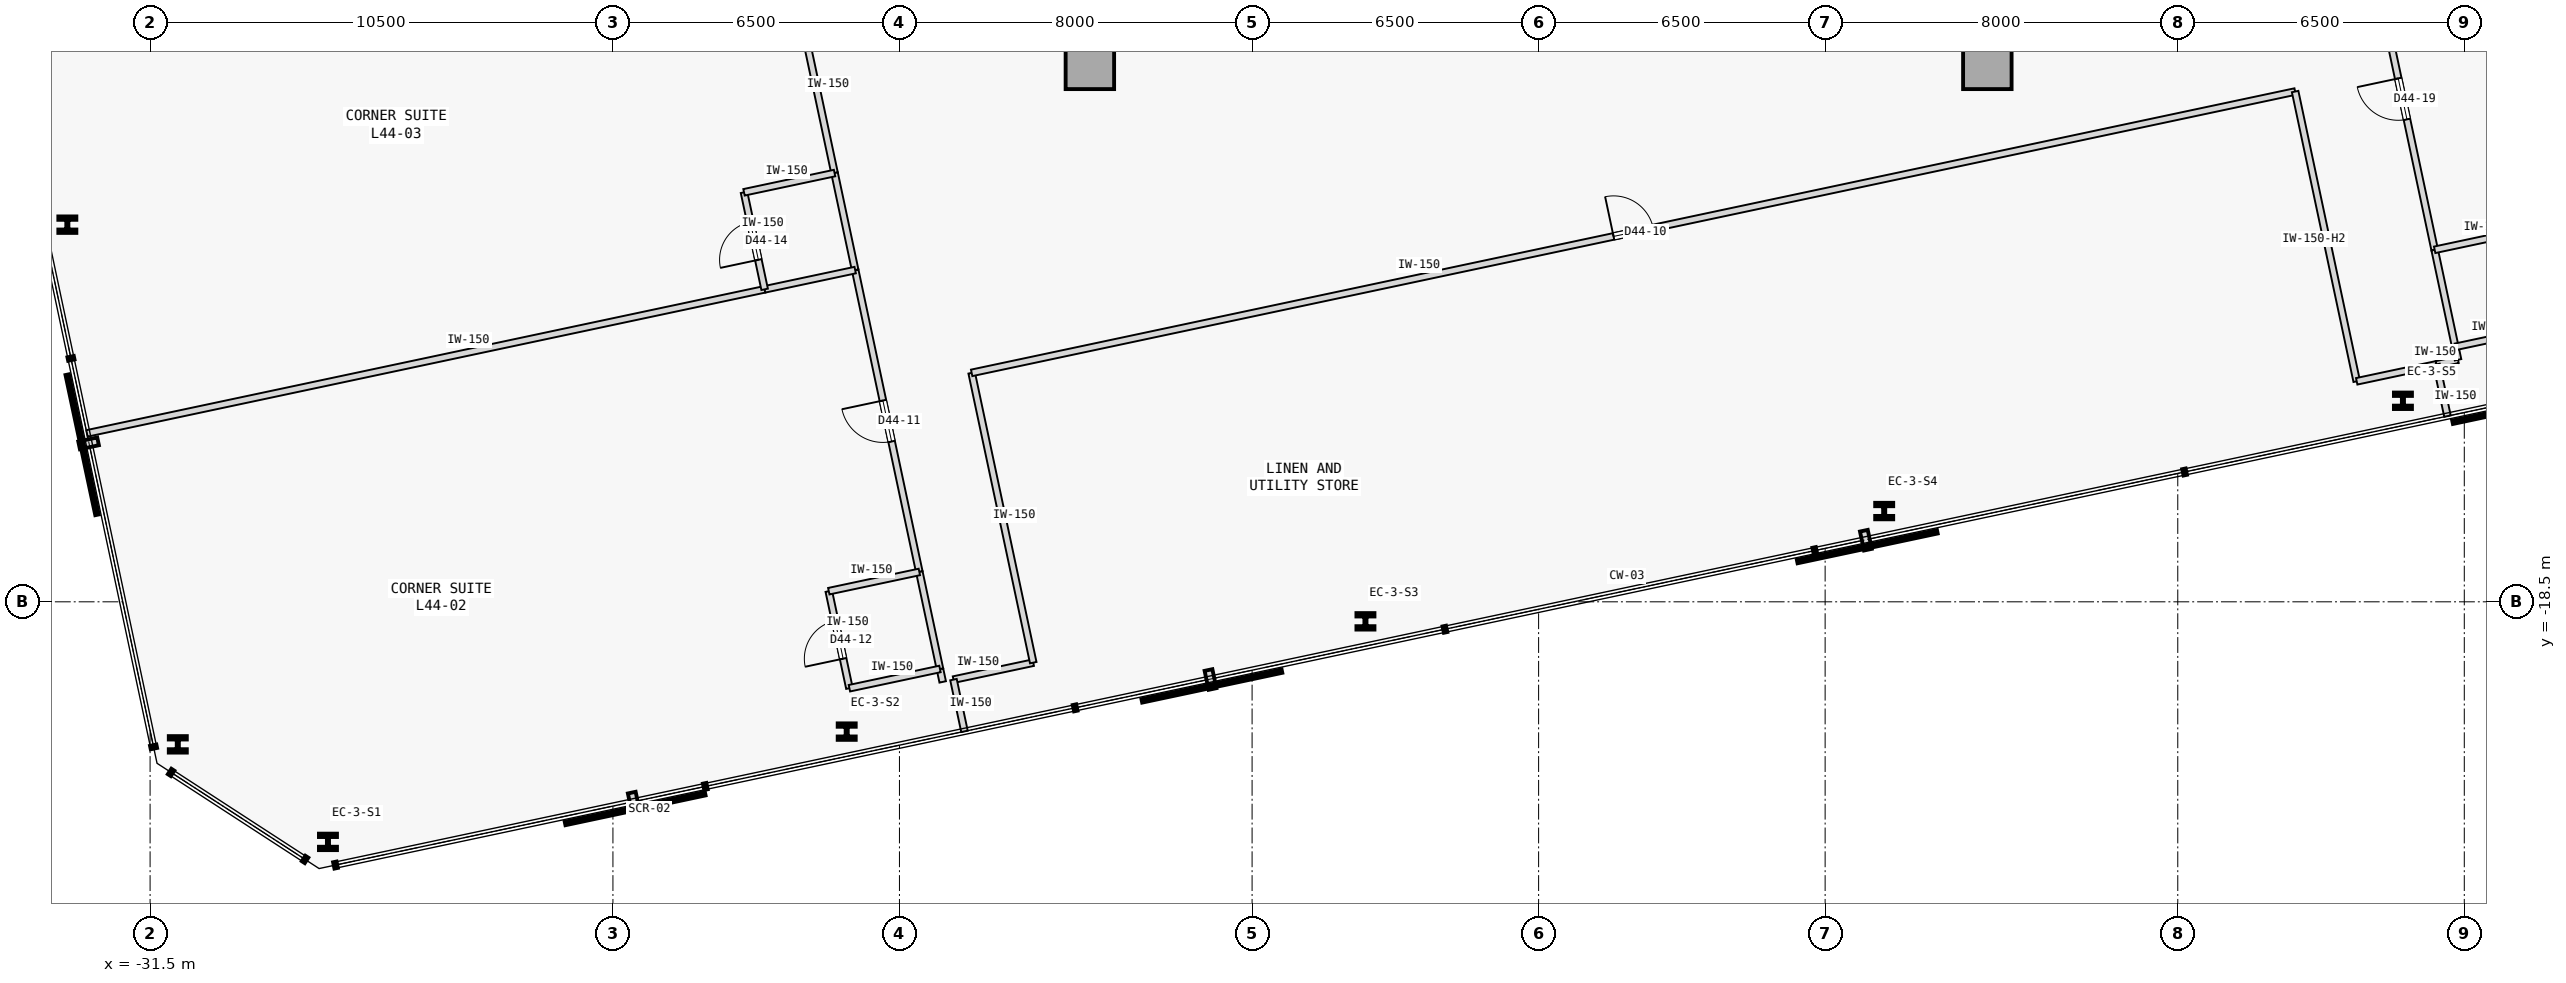
"""IFC4 building model, lengths in metres.
Left out: names, types, materials, properties, quantities, classifications, styles, units other than length and angle.
Written with IfcOpenShell. Run it as: python <this file> out.ifc"""

import sys

from ifc_helpers import new_model, si_unit, direction, frame, frame_2d, origin, origin_2d, place, context, subcontext, project, spatial, rectangle, i_section, extrude, element, fill, save


model = new_model("IFC4")
c1 = context("Model", 3, precision=1e-05, world=origin(), true_north=direction((0.0, 1.0)))
c2 = subcontext(c1, "Body", "Model", "MODEL_VIEW")
j1 = project(units=[si_unit("LENGTHUNIT", "METRE"), si_unit("PLANEANGLEUNIT", "RADIAN")], contexts=[c1])
p1 = place(None, origin())
s1 = spatial("IfcSite", under=j1, at=p1, CompositionType="ELEMENT")
p2 = place(p1, origin())
s2 = spatial("IfcBuilding", under=s1, at=p2, CompositionType="ELEMENT")
p3 = place(p2, frame((0.0, 0.0, 171.8)))
s3 = spatial("IfcBuildingStorey", under=s2, at=p3, CompositionType="ELEMENT", Elevation=171.8)
for number, where, z_axis, x_axis in (
    (1, (-10.18, -6.32, 0.0), (0.0, 0.0, 1.0), (1.0, 0.0, 0.0)),
    (2, (10.18, -6.32, 0.0), (0.0, 0.0, 1.0), (1.0, 0.0, 0.0)),
):
    element("IfcColumn", number, at=place(p3, frame(where, z_axis=z_axis, x_axis=x_axis)), inside=s3, PredefinedType="COLUMN", context=c2, shape_type="SweptSolid", body=[
        extrude(rectangle(XDim=1.1, YDim=1.1, at=origin_2d()), origin(), (0.0, 0.0, 1.0), 3.4),
    ])
for number, where, z_axis, x_axis in (
    (3, (-27.465, -23.946, 0.0), (0.0, 0.0, 1.0), (1.0, 0.0, 0.0)),
    (4, (-15.697, -21.444, 0.0), (0.0, 0.0, 1.0), (1.0, 0.0, 0.0)),
    (5, (-3.928, -18.943, 0.0), (0.0, 0.0, 1.0), (1.0, 0.0, 0.0)),
    (6, (7.84, -16.441, 0.0), (0.0, 0.0, 1.0), (1.0, 0.0, 0.0)),
    (7, (19.608, -13.94, 0.0), (0.0, 0.0, 1.0), (1.0, 0.0, 0.0)),
    (8, (-33.377, -9.945, 0.0), (0.0, 0.0, 1.0), (1.0, 0.0, 0.0)),
    (9, (-30.871, -21.733, 0.0), (0.0, 0.0, 1.0), (1.0, 0.0, 0.0)),
):
    element("IfcColumn", number, at=place(p3, frame(where, z_axis=z_axis, x_axis=x_axis)), inside=s3, PredefinedType="COLUMN", context=c2, shape_type="SweptSolid", body=[
        extrude(i_section(OverallWidth=0.409, OverallDepth=0.374, WebThickness=0.048, FlangeThickness=0.077, FilletRadius=0.015, at=origin_2d()), origin(), (0.0, 0.0, 1.0), 3.4),
    ])
p4 = place(p3, frame((-13.274, -20.265, 0.0), z_axis=(0.0, 0.0, 1.0), x_axis=(0.978160192495, 0.207852442415, 0.0)))
e10 = element("IfcWall", 10, at=p4, inside=s3, PredefinedType="PARTITIONING", context=c2, shape_type="SweptSolid", body=[
    extrude(rectangle(XDim=1.85, YDim=0.15, at=frame_2d((0.925, 0.0))), origin(), (0.0, 0.0, 1.0), 3.175),
])
p5 = place(p3, frame((-11.465, -19.88, 0.0), z_axis=(0.0, 0.0, 1.0), x_axis=(-0.207916109912, 0.978146661416, 0.0)))
e11 = element("IfcWall", 11, at=p5, inside=s3, PredefinedType="PARTITIONING", context=c2, shape_type="SweptSolid", body=[
    extrude(rectangle(XDim=6.72, YDim=0.15, at=frame_2d((3.36, 0.0))), origin(), (0.0, 0.0, 1.0), 3.175),
])
p6 = place(p3, frame((-12.862, -13.307, 0.0), z_axis=(0.0, 0.0, 1.0), x_axis=(0.97814793387, 0.207910123527, 0.0)))
e12 = element("IfcWall", 12, at=p6, inside=s3, PredefinedType="PARTITIONING", context=c2, shape_type="SweptSolid", body=[
    extrude(rectangle(XDim=30.695, YDim=0.15, at=frame_2d((15.348, 0.0))), origin(), (0.0, 0.0, 1.0), 3.175),
])
p7 = place(p6, frame((14.887, 0.0, 0.0)))
e13 = element("IfcOpeningElement", 13, at=p7, cuts=e12, PredefinedType="OPENING", context=c2, shape_type="SweptSolid", body=[
    extrude(rectangle(XDim=0.92, YDim=2.15, at=frame_2d((0.46, 1.075))), frame((0.0, 0.085, 0.0), z_axis=(0.0, -1.0, 0.0), x_axis=(1.0, 0.0, 0.0)), (0.0, 0.0, 1.0), 0.17),
])
p8 = place(p3, frame((18.56, -13.498, 0.0), z_axis=(0.0, 0.0, 1.0), x_axis=(-0.207888737749, 0.978152479278, 0.0)))
e14 = element("IfcWall", 14, at=p8, inside=s3, PredefinedType="PARTITIONING", context=c2, shape_type="SweptSolid", body=[
    extrude(rectangle(XDim=6.72, YDim=0.15, at=frame_2d((3.36, 0.0))), origin(), (0.0, 0.0, 1.0), 2.575),
])
p9 = place(p3, frame((18.56, -13.498, 0.0), z_axis=(0.0, 0.0, 1.0), x_axis=(0.978160192495, 0.207852442415, 0.0)))
e15 = element("IfcWall", 15, at=p9, inside=s3, PredefinedType="PARTITIONING", context=c2, shape_type="SweptSolid", body=[
    extrude(rectangle(XDim=1.85, YDim=0.15, at=frame_2d((0.925, 0.0))), origin(), (0.0, 0.0, 1.0), 3.175),
])
p10 = place(p3, frame((-13.519, -20.317, 0.0), z_axis=(0.0, 0.0, 1.0), x_axis=(-0.207527808066, 0.978229118806, 0.0)))
e16 = element("IfcWall", 16, at=p10, inside=s3, PredefinedType="PARTITIONING", context=c2, shape_type="SweptSolid", body=[
    extrude(rectangle(XDim=0.3, YDim=0.15, at=frame_2d((0.15, 0.0))), origin(), (0.0, 0.0, 1.0), 3.175),
])
p11 = place(p3, frame((-14.049, -17.823, 0.0), z_axis=(0.0, 0.0, 1.0), x_axis=(-0.207940096132, 0.978141562567, 0.0)))
e17 = element("IfcWall", 17, at=p11, inside=s3, PredefinedType="PARTITIONING", context=c2, shape_type="SweptSolid", body=[
    extrude(rectangle(XDim=7.0, YDim=0.15, at=frame_2d((3.5, 0.0))), origin(), (0.0, 0.0, 1.0), 3.175),
])
p12 = place(p11, frame((3.025, 0.0, 0.0)))
e18 = element("IfcOpeningElement", 18, at=p12, cuts=e17, PredefinedType="OPENING", context=c2, shape_type="SweptSolid", body=[
    extrude(rectangle(XDim=0.95, YDim=2.15, at=frame_2d((0.475, 1.075))), frame((0.0, 0.085, 0.0), z_axis=(0.0, -1.0, 0.0), x_axis=(1.0, 0.0, 0.0)), (0.0, 0.0, 1.0), 0.17),
])
p13 = place(p3, frame((-13.581, -20.023, 0.0), z_axis=(0.0, 0.0, 1.0), x_axis=(-0.207891197838, 0.978151956427, 0.0)))
e19 = element("IfcWall", 19, at=p13, inside=s3, PredefinedType="PARTITIONING", context=c2, shape_type="SweptSolid", body=[
    extrude(rectangle(XDim=2.25, YDim=0.15, at=frame_2d((1.125, 0.0))), origin(), (0.0, 0.0, 1.0), 3.175),
])
p14 = place(p3, frame((-15.972, -8.775, 0.0), z_axis=(0.0, 0.0, 1.0), x_axis=(-0.207894825434, 0.97815118543, 0.0)))
e20 = element("IfcWall", 20, at=p14, inside=s3, PredefinedType="PARTITIONING", context=c2, shape_type="SweptSolid", body=[
    extrude(rectangle(XDim=8.5, YDim=0.15, at=frame_2d((4.25, 0.0))), origin(), (0.0, 0.0, 1.0), 3.175),
])
p15 = place(p14, frame((5.05, 0.0, 0.0)))
e21 = element("IfcOpeningElement", 21, at=p15, cuts=e20, PredefinedType="OPENING", context=c2, shape_type="SweptSolid", body=[
    extrude(rectangle(XDim=0.95, YDim=2.15, at=frame_2d((0.475, 1.075))), frame((0.0, 0.085, 0.0), z_axis=(0.0, -1.0, 0.0), x_axis=(1.0, 0.0, 0.0)), (0.0, 0.0, 1.0), 0.17),
])
p16 = place(p3, frame((-15.504, -10.976, 0.0), z_axis=(0.0, 0.0, 1.0), x_axis=(-0.207891197838, 0.978151956427, 0.0)))
e22 = element("IfcWall", 22, at=p16, inside=s3, PredefinedType="PARTITIONING", context=c2, shape_type="SweptSolid", body=[
    extrude(rectangle(XDim=2.25, YDim=0.15, at=frame_2d((1.125, 0.0))), origin(), (0.0, 0.0, 1.0), 3.175),
])
p17 = place(p3, frame((20.369, -13.114, 0.0), z_axis=(0.0, 0.0, 1.0), x_axis=(0.978143962546, 0.207928806409, 0.0)))
e23 = element("IfcWall", 23, at=p17, inside=s3, PredefinedType="PARTITIONING", context=c2, shape_type="SweptSolid", body=[
    extrude(rectangle(XDim=0.5, YDim=0.15, at=frame_2d((0.25, 0.0))), origin(), (0.0, 0.0, 1.0), 3.175),
])
p18 = place(p3, frame((20.858, -13.01, 0.0), z_axis=(0.0, 0.0, 1.0), x_axis=(-0.208306395052, 0.978063620518, 0.0)))
e24 = element("IfcWall", 24, at=p18, inside=s3, PredefinedType="PARTITIONING", context=c2, shape_type="SweptSolid", body=[
    extrude(rectangle(XDim=0.3, YDim=0.15, at=frame_2d((0.15, 0.0))), origin(), (0.0, 0.0, 1.0), 3.175),
])
p19 = place(p3, frame((20.328, -10.515, 0.0), z_axis=(0.0, 0.0, 1.0), x_axis=(-0.207906726269, 0.978148655968, 0.0)))
e25 = element("IfcWall", 25, at=p19, inside=s3, PredefinedType="PARTITIONING", context=c2, shape_type="SweptSolid", body=[
    extrude(rectangle(XDim=7.0, YDim=0.15, at=frame_2d((3.5, 0.0))), origin(), (0.0, 0.0, 1.0), 3.175),
])
p20 = place(p19, frame((3.025, 0.0, 0.0)))
e26 = element("IfcOpeningElement", 26, at=p20, cuts=e25, PredefinedType="OPENING", context=c2, shape_type="SweptSolid", body=[
    extrude(rectangle(XDim=0.95, YDim=2.15, at=frame_2d((0.475, 1.075))), frame((0.0, 0.085, 0.0), z_axis=(0.0, -1.0, 0.0), x_axis=(1.0, 0.0, 0.0)), (0.0, 0.0, 1.0), 0.17),
])
p21 = place(p3, frame((20.796, -12.716, 0.0), z_axis=(0.0, 0.0, 1.0), x_axis=(-0.207891197838, 0.978151956427, 0.0)))
e27 = element("IfcWall", 27, at=p21, inside=s3, PredefinedType="PARTITIONING", context=c2, shape_type="SweptSolid", body=[
    extrude(rectangle(XDim=2.25, YDim=0.15, at=frame_2d((1.125, 0.0))), origin(), (0.0, 0.0, 1.0), 3.175),
])
for number, where, z_axis, x_axis in (
    (28, (-13.025, -21.439, 0.0), (0.0, 0.0, 1.0), (-0.208, 0.978, 0.0)),
    (29, (20.619, -14.288, 0.0), (0.0, 0.0, 1.0), (-0.208, 0.978, 0.0)),
):
    element("IfcWall", number, at=place(p3, frame(where, z_axis=z_axis, x_axis=x_axis)), inside=s3, PredefinedType="PARTITIONING", context=c2, shape_type="SweptSolid", body=[
        extrude(rectangle(XDim=1.2, YDim=0.15, at=frame_2d((0.6, 0.0))), origin(), (0.0, 0.0, 1.0), 3.175),
    ])
p22 = place(p3, frame((-15.635, -20.46, 0.0), z_axis=(0.0, 0.0, 1.0), x_axis=(-0.207913264065, 0.978147266328, 0.0)))
e30 = element("IfcWall", 30, at=p22, inside=s3, PredefinedType="PARTITIONING", context=c2, shape_type="SweptSolid", body=[
    extrude(rectangle(XDim=2.25, YDim=0.15, at=frame_2d((1.125, 0.0))), origin(), (0.0, 0.0, 1.0), 3.175),
])
p23 = place(p22, frame((0.685, 0.0, 0.0)))
e31 = element("IfcOpeningElement", 31, at=p23, cuts=e30, PredefinedType="OPENING", context=c2, shape_type="SweptSolid", body=[
    extrude(rectangle(XDim=0.88, YDim=2.15, at=frame_2d((0.44, 1.075))), frame((0.0, 0.085, 0.0), z_axis=(0.0, -1.0, 0.0), x_axis=(1.0, 0.0, 0.0)), (0.0, 0.0, 1.0), 0.17),
])
for number, where, z_axis, x_axis in (
    (32, (-15.635, -20.46, 0.0), (0.0, 0.0, 1.0), (0.978, 0.208, 0.0)),
    (33, (-16.103, -18.259, 0.0), (0.0, 0.0, 1.0), (0.978, 0.208, 0.0)),
):
    element("IfcWall", number, at=place(p3, frame(where, z_axis=z_axis, x_axis=x_axis)), inside=s3, PredefinedType="PARTITIONING", context=c2, shape_type="SweptSolid", body=[
        extrude(rectangle(XDim=2.1, YDim=0.15, at=frame_2d((1.05, 0.0))), origin(), (0.0, 0.0, 1.0), 3.175),
    ])
p24 = place(p3, frame((-32.933, -14.68, 0.0), z_axis=(0.0, 0.0, 1.0), x_axis=(0.978146137903, 0.207918572776, 0.0)))
e34 = element("IfcWall", 34, at=p24, inside=s3, PredefinedType="PARTITIONING", context=c2, shape_type="SweptSolid", body=[
    extrude(rectangle(XDim=15.718, YDim=0.15, at=frame_2d((7.859, 0.0))), origin(), (0.0, 0.0, 1.0), 3.175),
])
p25 = place(p3, frame((-17.558, -11.412, 0.0), z_axis=(0.0, 0.0, 1.0), x_axis=(0.978153236239, 0.207885176084, 0.0)))
e35 = element("IfcWall", 35, at=p25, inside=s3, PredefinedType="PARTITIONING", context=c2, shape_type="SweptSolid", body=[
    extrude(rectangle(XDim=2.1, YDim=0.15, at=frame_2d((1.05, 0.0))), origin(), (0.0, 0.0, 1.0), 3.175),
])
p26 = place(p3, frame((-17.558, -11.412, 0.0), z_axis=(0.0, 0.0, 1.0), x_axis=(-0.207891197838, 0.978151956427, 0.0)))
e36 = element("IfcWall", 36, at=p26, inside=s3, PredefinedType="PARTITIONING", context=c2, shape_type="SweptSolid", body=[
    extrude(rectangle(XDim=2.25, YDim=0.15, at=frame_2d((1.125, 0.0))), origin(), (0.0, 0.0, 1.0), 3.175),
])
p27 = place(p26, frame((0.685, 0.0, 0.0)))
e37 = element("IfcOpeningElement", 37, at=p27, cuts=e36, PredefinedType="OPENING", context=c2, shape_type="SweptSolid", body=[
    extrude(rectangle(XDim=0.88, YDim=2.15, at=frame_2d((0.44, 1.075))), frame((0.0, 0.085, 0.0), z_axis=(0.0, -1.0, 0.0), x_axis=(1.0, 0.0, 0.0)), (0.0, 0.0, 1.0), 0.17),
])
p28 = place(p3, frame((-18.026, -9.211, 0.0), z_axis=(0.0, 0.0, 1.0), x_axis=(0.978153236239, 0.207885176084, 0.0)))
e38 = element("IfcWall", 38, at=p28, inside=s3, PredefinedType="PARTITIONING", context=c2, shape_type="SweptSolid", body=[
    extrude(rectangle(XDim=2.1, YDim=0.15, at=frame_2d((1.05, 0.0))), origin(), (0.0, 0.0, 1.0), 3.175),
])
for number, where, z_axis, x_axis in (
    (39, (20.796, -12.716, 0.0), (0.0, 0.0, 1.0), (0.978, 0.208, 0.0)),
    (40, (20.328, -10.515, 0.0), (0.0, 0.0, 1.0), (0.978, 0.208, 0.0)),
):
    element("IfcWall", number, at=place(p3, frame(where, z_axis=z_axis, x_axis=x_axis)), inside=s3, PredefinedType="PARTITIONING", context=c2, shape_type="SweptSolid", body=[
        extrude(rectangle(XDim=1.85, YDim=0.15, at=frame_2d((0.925, 0.0))), origin(), (0.0, 0.0, 1.0), 3.175),
    ])
p29 = place(p7, origin())
e41 = element("IfcDoor", 41, at=p29, inside=s3, OperationType="SINGLE_SWING_LEFT", PredefinedType="DOOR", context=c2, shape_type="SweptSolid", body=[
    extrude(rectangle(XDim=0.92, YDim=2.15, at=frame_2d((0.46, 1.075))), frame((0.0, 0.025, 0.0), z_axis=(0.0, -1.0, 0.0), x_axis=(1.0, 0.0, 0.0)), (0.0, 0.0, 1.0), 0.05),
])
fill(e13, e41)
p30 = place(p12, origin())
e42 = element("IfcDoor", 42, at=p30, inside=s3, OperationType="SINGLE_SWING_RIGHT", PredefinedType="DOOR", context=c2, shape_type="SweptSolid", body=[
    extrude(rectangle(XDim=0.95, YDim=2.15, at=frame_2d((0.475, 1.075))), frame((0.0, 0.025, 0.0), z_axis=(0.0, -1.0, 0.0), x_axis=(1.0, 0.0, 0.0)), (0.0, 0.0, 1.0), 0.05),
])
fill(e18, e42)
p31 = place(p23, origin())
e43 = element("IfcDoor", 43, at=p31, inside=s3, OperationType="SINGLE_SWING_LEFT", PredefinedType="DOOR", context=c2, shape_type="SweptSolid", body=[
    extrude(rectangle(XDim=0.88, YDim=2.15, at=frame_2d((0.44, 1.075))), frame((0.0, 0.025, 0.0), z_axis=(0.0, -1.0, 0.0), x_axis=(1.0, 0.0, 0.0)), (0.0, 0.0, 1.0), 0.05),
])
fill(e31, e43)
p32 = place(p27, origin())
e44 = element("IfcDoor", 44, at=p32, inside=s3, OperationType="SINGLE_SWING_LEFT", PredefinedType="DOOR", context=c2, shape_type="SweptSolid", body=[
    extrude(rectangle(XDim=0.88, YDim=2.15, at=frame_2d((0.44, 1.075))), frame((0.0, 0.025, 0.0), z_axis=(0.0, -1.0, 0.0), x_axis=(1.0, 0.0, 0.0)), (0.0, 0.0, 1.0), 0.05),
])
fill(e37, e44)
p33 = place(p20, origin())
e45 = element("IfcDoor", 45, at=p33, inside=s3, OperationType="SINGLE_SWING_RIGHT", PredefinedType="DOOR", context=c2, shape_type="SweptSolid", body=[
    extrude(rectangle(XDim=0.95, YDim=2.15, at=frame_2d((0.475, 1.075))), frame((0.0, 0.025, 0.0), z_axis=(0.0, -1.0, 0.0), x_axis=(1.0, 0.0, 0.0)), (0.0, 0.0, 1.0), 0.05),
])
fill(e26, e45)
save(model, sys.argv[1])
